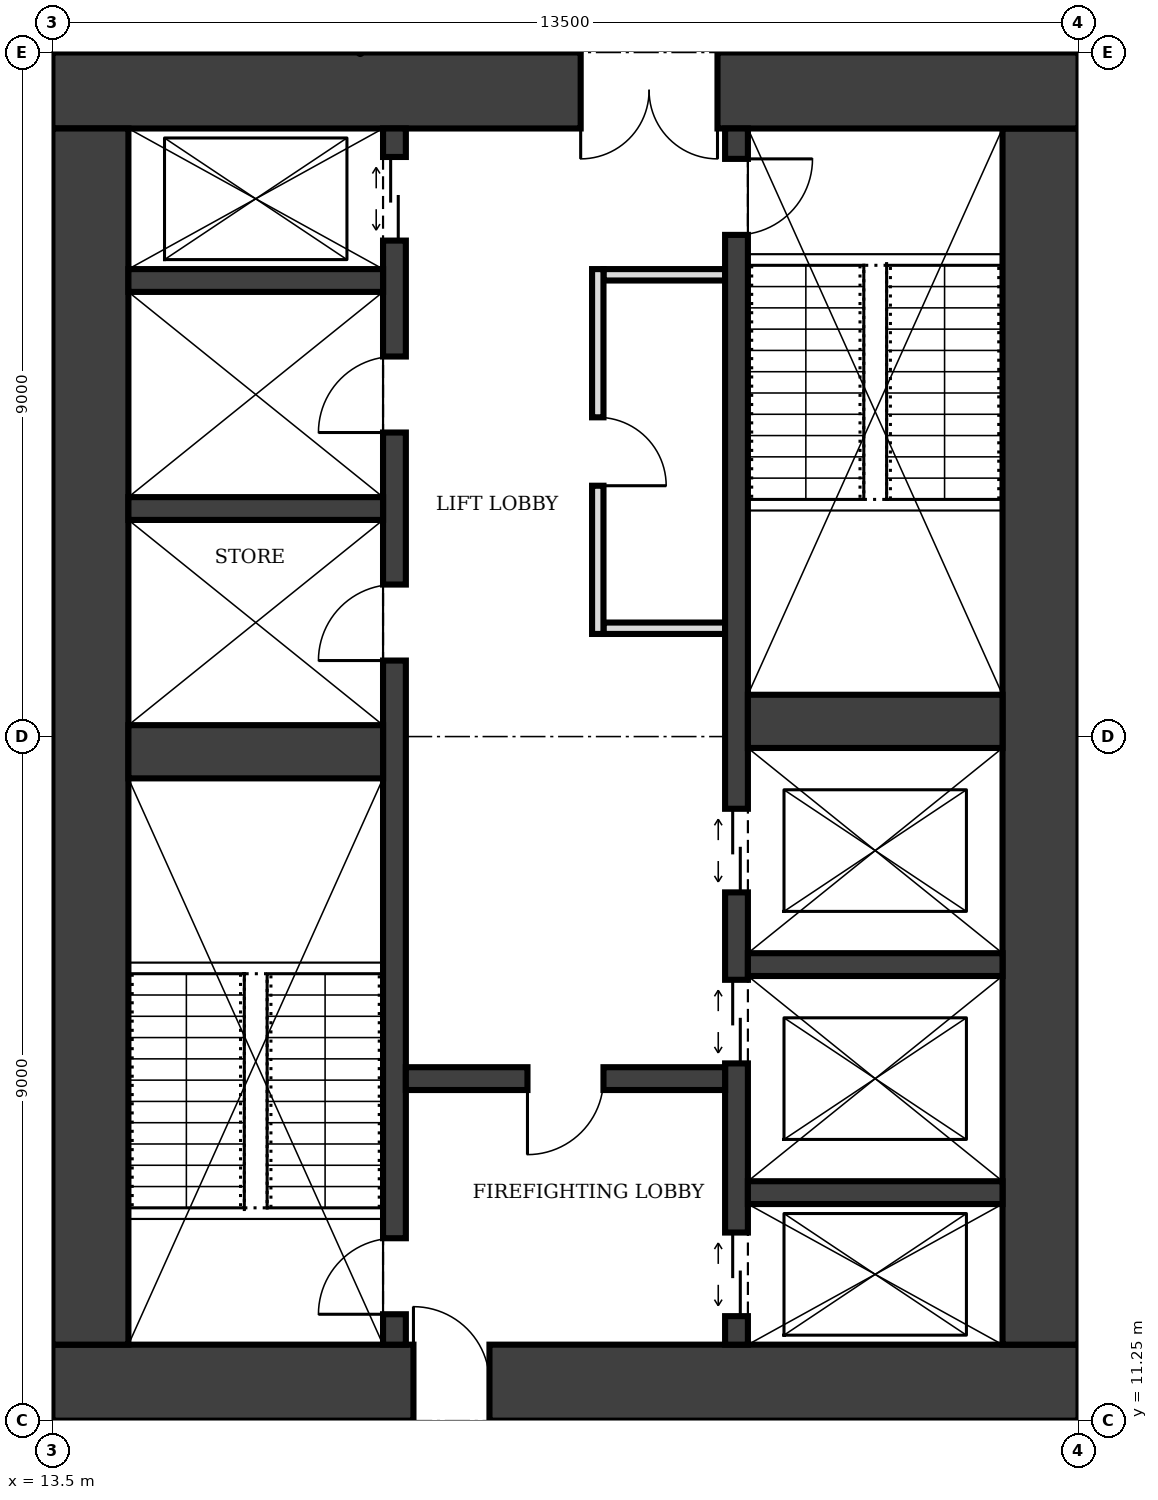
"""IFC4 building model, lengths in metres.
Left out: names, types, materials, properties, quantities, classifications, styles, units other than length and angle.
Written with IfcOpenShell. Run it as: python <this file> out.ifc"""

import sys

from ifc_helpers import new_model, si_unit, direction, frame, frame_2d, origin, place, context, subcontext, project, spatial, rectangle, extrude, element, fill, save


model = new_model("IFC4")
c1 = context("Model", 3, precision=1e-05, world=origin(), true_north=direction((0.0, 1.0)))
c2 = subcontext(c1, "Body", "Model", "MODEL_VIEW")
j1 = project(units=[si_unit("LENGTHUNIT", "METRE"), si_unit("PLANEANGLEUNIT", "RADIAN")], contexts=[c1])
p1 = place(None, origin())
s1 = spatial("IfcSite", under=j1, at=p1, CompositionType="ELEMENT")
p2 = place(p1, origin())
s2 = spatial("IfcBuilding", under=s1, at=p2, CompositionType="ELEMENT")
p3 = place(p2, frame((0.0, 0.0, 133.0)))
s3 = spatial("IfcBuildingStorey", under=s2, at=p3, CompositionType="ELEMENT", Elevation=133.0)
p4 = place(p3, frame((13.5, 11.75, 0.0), z_axis=(0.0, 0.0, 1.0), x_axis=(1.0, 0.0, 0.0)))
e1 = element("IfcWall", 1, at=p4, inside=s3, PredefinedType="SHEAR", context=c2, shape_type="SweptSolid", body=[
    extrude(rectangle(XDim=13.5, YDim=1.0, at=frame_2d((6.75, 0.0))), origin(), (0.0, 0.0, 1.0), 4.0),
])
p5 = place(p4, frame((4.75, 0.0, 0.0)))
e2 = element("IfcOpeningElement", 2, at=p5, cuts=e1, PredefinedType="OPENING", context=c2, shape_type="SweptSolid", body=[
    extrude(rectangle(XDim=1.0, YDim=2.1, at=frame_2d((0.5, 1.05))), frame((0.0, 0.51, 0.0), z_axis=(0.0, -1.0, 0.0), x_axis=(1.0, 0.0, 0.0)), (0.0, 0.0, 1.0), 1.02),
])
p6 = place(p3, frame((26.5, 12.25, 0.0), z_axis=(0.0, 0.0, 1.0), x_axis=(0.0, 1.0, 0.0)))
e3 = element("IfcWall", 3, at=p6, inside=s3, PredefinedType="SHEAR", context=c2, shape_type="SweptSolid", body=[
    extrude(rectangle(XDim=16.0, YDim=1.0, at=frame_2d((8.0, 0.0))), origin(), (0.0, 0.0, 1.0), 4.0),
])
p7 = place(p3, frame((27.0, 28.75, 0.0), z_axis=(0.0, 0.0, 1.0), x_axis=(-1.0, 0.0, 0.0)))
e4 = element("IfcWall", 4, at=p7, inside=s3, PredefinedType="SHEAR", context=c2, shape_type="SweptSolid", body=[
    extrude(rectangle(XDim=13.5, YDim=1.0, at=frame_2d((6.75, 0.0))), origin(), (0.0, 0.0, 1.0), 4.0),
])
p8 = place(p7, frame((4.75, 0.0, 0.0)))
e5 = element("IfcOpeningElement", 5, at=p8, cuts=e4, PredefinedType="OPENING", context=c2, shape_type="SweptSolid", body=[
    extrude(rectangle(XDim=1.8, YDim=2.1, at=frame_2d((0.9, 1.05))), frame((0.0, 0.51, 0.0), z_axis=(0.0, -1.0, 0.0), x_axis=(1.0, 0.0, 0.0)), (0.0, 0.0, 1.0), 1.02),
])
p9 = place(p3, frame((14.0, 28.25, 0.0), z_axis=(0.0, 0.0, 1.0), x_axis=(0.0, -1.0, 0.0)))
e6 = element("IfcWall", 6, at=p9, inside=s3, PredefinedType="SHEAR", context=c2, shape_type="SweptSolid", body=[
    extrude(rectangle(XDim=16.0, YDim=1.0, at=frame_2d((8.0, 0.0))), origin(), (0.0, 0.0, 1.0), 4.0),
])
p10 = place(p3, frame((18.0, 12.25, 0.0), z_axis=(0.0, 0.0, 1.0), x_axis=(0.0, 1.0, 0.0)))
e7 = element("IfcWall", 7, at=p10, inside=s3, PredefinedType="SHEAR", context=c2, shape_type="SweptSolid", body=[
    extrude(rectangle(XDim=16.0, YDim=0.3, at=frame_2d((8.0, 0.0))), origin(), (0.0, 0.0, 1.0), 4.0),
])
p11 = place(p10, frame((0.4, 0.0, 0.0)))
e8 = element("IfcOpeningElement", 8, at=p11, cuts=e7, PredefinedType="OPENING", context=c2, shape_type="SweptSolid", body=[
    extrude(rectangle(XDim=1.0, YDim=2.1, at=frame_2d((0.5, 1.05))), frame((0.0, 0.16, 0.0), z_axis=(0.0, -1.0, 0.0), x_axis=(1.0, 0.0, 0.0)), (0.0, 0.0, 1.0), 0.32),
])
p12 = place(p10, frame((14.525, 0.0, 0.0)))
e9 = element("IfcOpeningElement", 9, at=p12, cuts=e7, PredefinedType="OPENING", context=c2, shape_type="SweptSolid", body=[
    extrude(rectangle(XDim=1.1, YDim=2.1, at=frame_2d((0.55, 1.05))), frame((0.0, 0.16, 0.0), z_axis=(0.0, -1.0, 0.0), x_axis=(1.0, 0.0, 0.0)), (0.0, 0.0, 1.0), 0.32),
])
p13 = place(p10, frame((9.0, 0.0, 0.0)))
e10 = element("IfcOpeningElement", 10, at=p13, cuts=e7, PredefinedType="OPENING", context=c2, shape_type="SweptSolid", body=[
    extrude(rectangle(XDim=1.0, YDim=2.1, at=frame_2d((0.5, 1.05))), frame((0.0, 0.16, 0.0), z_axis=(0.0, -1.0, 0.0), x_axis=(1.0, 0.0, 0.0)), (0.0, 0.0, 1.0), 0.32),
])
p14 = place(p10, frame((12.0, 0.0, 0.0)))
e11 = element("IfcOpeningElement", 11, at=p14, cuts=e7, PredefinedType="OPENING", context=c2, shape_type="SweptSolid", body=[
    extrude(rectangle(XDim=1.0, YDim=2.1, at=frame_2d((0.5, 1.05))), frame((0.0, 0.16, 0.0), z_axis=(0.0, -1.0, 0.0), x_axis=(1.0, 0.0, 0.0)), (0.0, 0.0, 1.0), 0.32),
])
p15 = place(p3, frame((22.5, 12.25, 0.0), z_axis=(0.0, 0.0, 1.0), x_axis=(0.0, 1.0, 0.0)))
e12 = element("IfcWall", 12, at=p15, inside=s3, PredefinedType="SHEAR", context=c2, shape_type="SweptSolid", body=[
    extrude(rectangle(XDim=16.0, YDim=0.3, at=frame_2d((8.0, 0.0))), origin(), (0.0, 0.0, 1.0), 4.0),
])
p16 = place(p15, frame((14.6, 0.0, 0.0)))
e13 = element("IfcOpeningElement", 13, at=p16, cuts=e12, PredefinedType="OPENING", context=c2, shape_type="SweptSolid", body=[
    extrude(rectangle(XDim=1.0, YDim=2.1, at=frame_2d((0.5, 1.05))), frame((0.0, 0.16, 0.0), z_axis=(0.0, -1.0, 0.0), x_axis=(1.0, 0.0, 0.0)), (0.0, 0.0, 1.0), 0.32),
])
p17 = place(p15, frame((0.375, 0.0, 0.0)))
e14 = element("IfcOpeningElement", 14, at=p17, cuts=e12, PredefinedType="OPENING", context=c2, shape_type="SweptSolid", body=[
    extrude(rectangle(XDim=1.1, YDim=2.1, at=frame_2d((0.55, 1.05))), frame((0.0, 0.16, 0.0), z_axis=(0.0, -1.0, 0.0), x_axis=(1.0, 0.0, 0.0)), (0.0, 0.0, 1.0), 0.32),
])
p18 = place(p15, frame((3.7, 0.0, 0.0)))
e15 = element("IfcOpeningElement", 15, at=p18, cuts=e12, PredefinedType="OPENING", context=c2, shape_type="SweptSolid", body=[
    extrude(rectangle(XDim=1.1, YDim=2.1, at=frame_2d((0.55, 1.05))), frame((0.0, 0.16, 0.0), z_axis=(0.0, -1.0, 0.0), x_axis=(1.0, 0.0, 0.0)), (0.0, 0.0, 1.0), 0.32),
])
p19 = place(p15, frame((5.95, 0.0, 0.0)))
e16 = element("IfcOpeningElement", 16, at=p19, cuts=e12, PredefinedType="OPENING", context=c2, shape_type="SweptSolid", body=[
    extrude(rectangle(XDim=1.1, YDim=2.1, at=frame_2d((0.55, 1.05))), frame((0.0, 0.16, 0.0), z_axis=(0.0, -1.0, 0.0), x_axis=(1.0, 0.0, 0.0)), (0.0, 0.0, 1.0), 0.32),
])
p20 = place(p3, frame((14.5, 20.05, 0.0), z_axis=(0.0, 0.0, 1.0), x_axis=(1.0, 0.0, 0.0)))
e17 = element("IfcWall", 17, at=p20, inside=s3, PredefinedType="SHEAR", context=c2, shape_type="SweptSolid", body=[
    extrude(rectangle(XDim=3.35, YDim=0.7, at=frame_2d((1.675, 0.0))), origin(), (0.0, 0.0, 1.0), 4.0),
])
p21 = place(p3, frame((18.15, 15.75, 0.0), z_axis=(0.0, 0.0, 1.0), x_axis=(1.0, 0.0, 0.0)))
e18 = element("IfcWall", 18, at=p21, inside=s3, PredefinedType="SHEAR", context=c2, shape_type="SweptSolid", body=[
    extrude(rectangle(XDim=4.2, YDim=0.3, at=frame_2d((2.1, 0.0))), origin(), (0.0, 0.0, 1.0), 4.0),
])
p22 = place(p21, frame((1.6, 0.0, 0.0)))
e19 = element("IfcOpeningElement", 19, at=p22, cuts=e18, PredefinedType="OPENING", context=c2, shape_type="SweptSolid", body=[
    extrude(rectangle(XDim=1.0, YDim=2.1, at=frame_2d((0.5, 1.05))), frame((0.0, 0.16, 0.0), z_axis=(0.0, -1.0, 0.0), x_axis=(1.0, 0.0, 0.0)), (0.0, 0.0, 1.0), 0.32),
])
for number, where, z_axis, x_axis in (
    (20, (22.65, 14.25, 0.0), (0.0, 0.0, 1.0), (1.0, 0.0, 0.0)),
    (21, (22.65, 17.25, 0.0), (0.0, 0.0, 1.0), (1.0, 0.0, 0.0)),
):
    element("IfcWall", number, at=place(p3, frame(where, z_axis=z_axis, x_axis=x_axis)), inside=s3, PredefinedType="SHEAR", context=c2, shape_type="SweptSolid", body=[
        extrude(rectangle(XDim=3.35, YDim=0.3, at=frame_2d((1.675, 0.0))), origin(), (0.0, 0.0, 1.0), 4.0),
    ])
p23 = place(p3, frame((22.65, 20.45, 0.0), z_axis=(0.0, 0.0, 1.0), x_axis=(1.0, 0.0, 0.0)))
e22 = element("IfcWall", 22, at=p23, inside=s3, PredefinedType="SHEAR", context=c2, shape_type="SweptSolid", body=[
    extrude(rectangle(XDim=3.35, YDim=0.7, at=frame_2d((1.675, 0.0))), origin(), (0.0, 0.0, 1.0), 4.0),
])
for number, where, z_axis, x_axis in (
    (23, (14.5, 23.25, 0.0), (0.0, 0.0, 1.0), (1.0, 0.0, 0.0)),
    (24, (14.5, 26.25, 0.0), (0.0, 0.0, 1.0), (1.0, 0.0, 0.0)),
):
    element("IfcWall", number, at=place(p3, frame(where, z_axis=z_axis, x_axis=x_axis)), inside=s3, PredefinedType="SHEAR", context=c2, shape_type="SweptSolid", body=[
        extrude(rectangle(XDim=3.35, YDim=0.3, at=frame_2d((1.675, 0.0))), origin(), (0.0, 0.0, 1.0), 4.0),
    ])
p24 = place(p3, frame((20.675, 21.6, 0.0), z_axis=(0.0, 0.0, 1.0), x_axis=(0.0, 1.0, 0.0)))
e25 = element("IfcWall", 25, at=p24, inside=s3, PredefinedType="PARTITIONING", context=c2, shape_type="SweptSolid", body=[
    extrude(rectangle(XDim=4.8, YDim=0.15, at=frame_2d((2.4, 0.0))), origin(), (0.0, 0.0, 1.0), 3.75),
])
p25 = place(p24, frame((1.95, 0.0, 0.0)))
e26 = element("IfcOpeningElement", 26, at=p25, cuts=e25, PredefinedType="OPENING", context=c2, shape_type="SweptSolid", body=[
    extrude(rectangle(XDim=0.9, YDim=2.1, at=frame_2d((0.45, 1.05))), frame((0.0, 0.085, 0.0), z_axis=(0.0, -1.0, 0.0), x_axis=(1.0, 0.0, 0.0)), (0.0, 0.0, 1.0), 0.17),
])
for number, where, z_axis, x_axis in (
    (27, (20.75, 21.675, 0.0), (0.0, 0.0, 1.0), (1.0, 0.0, 0.0)),
    (28, (20.75, 26.325, 0.0), (0.0, 0.0, 1.0), (1.0, 0.0, 0.0)),
):
    element("IfcWall", number, at=place(p3, frame(where, z_axis=z_axis, x_axis=x_axis)), inside=s3, PredefinedType="PARTITIONING", context=c2, shape_type="SweptSolid", body=[
        extrude(rectangle(XDim=1.6, YDim=0.15, at=frame_2d((0.8, 0.0))), origin(), (0.0, 0.0, 1.0), 3.75),
    ])
p26 = place(p5, origin())
e29 = element("IfcDoor", 29, at=p26, inside=s3, OperationType="SINGLE_SWING_LEFT", PredefinedType="DOOR", context=c2, shape_type="SweptSolid", body=[
    extrude(rectangle(XDim=1.0, YDim=2.1, at=frame_2d((0.5, 1.05))), frame((0.0, 0.025, 0.0), z_axis=(0.0, -1.0, 0.0), x_axis=(1.0, 0.0, 0.0)), (0.0, 0.0, 1.0), 0.05),
])
fill(e2, e29)
p27 = place(p8, origin())
e30 = element("IfcDoor", 30, at=p27, inside=s3, OperationType="DOUBLE_DOOR_SINGLE_SWING", PredefinedType="DOOR", context=c2, shape_type="SweptSolid", body=[
    extrude(rectangle(XDim=1.8, YDim=2.1, at=frame_2d((0.9, 1.05))), frame((0.0, 0.025, 0.0), z_axis=(0.0, -1.0, 0.0), x_axis=(1.0, 0.0, 0.0)), (0.0, 0.0, 1.0), 0.05),
])
fill(e5, e30)
p28 = place(p22, frame((1.0, 0.0, 0.0), z_axis=(0.0, 0.0, 1.0), x_axis=(-1.0, 0.0, 0.0)))
e31 = element("IfcDoor", 31, at=p28, inside=s3, OperationType="SINGLE_SWING_RIGHT", PredefinedType="DOOR", context=c2, shape_type="SweptSolid", body=[
    extrude(rectangle(XDim=1.0, YDim=2.1, at=frame_2d((0.5, 1.05))), frame((0.0, 0.025, 0.0), z_axis=(0.0, -1.0, 0.0), x_axis=(1.0, 0.0, 0.0)), (0.0, 0.0, 1.0), 0.05),
])
fill(e19, e31)
p29 = place(p11, origin())
e32 = element("IfcDoor", 32, at=p29, inside=s3, OperationType="SINGLE_SWING_LEFT", PredefinedType="DOOR", context=c2, shape_type="SweptSolid", body=[
    extrude(rectangle(XDim=1.0, YDim=2.1, at=frame_2d((0.5, 1.05))), frame((0.0, 0.025, 0.0), z_axis=(0.0, -1.0, 0.0), x_axis=(1.0, 0.0, 0.0)), (0.0, 0.0, 1.0), 0.05),
])
fill(e8, e32)
p30 = place(p16, frame((1.0, 0.0, 0.0), z_axis=(0.0, 0.0, 1.0), x_axis=(-1.0, 0.0, 0.0)))
e33 = element("IfcDoor", 33, at=p30, inside=s3, OperationType="SINGLE_SWING_LEFT", PredefinedType="DOOR", context=c2, shape_type="SweptSolid", body=[
    extrude(rectangle(XDim=1.0, YDim=2.1, at=frame_2d((0.5, 1.05))), frame((0.0, 0.025, 0.0), z_axis=(0.0, -1.0, 0.0), x_axis=(1.0, 0.0, 0.0)), (0.0, 0.0, 1.0), 0.05),
])
fill(e13, e33)
p31 = place(p17, origin())
e34 = element("IfcDoor", 34, at=p31, inside=s3, OperationType="DOUBLE_DOOR_SLIDING", PredefinedType="DOOR", context=c2, shape_type="SweptSolid", body=[
    extrude(rectangle(XDim=1.1, YDim=2.1, at=frame_2d((0.55, 1.05))), frame((0.0, 0.025, 0.0), z_axis=(0.0, -1.0, 0.0), x_axis=(1.0, 0.0, 0.0)), (0.0, 0.0, 1.0), 0.05),
])
fill(e14, e34)
p32 = place(p12, origin())
e35 = element("IfcDoor", 35, at=p32, inside=s3, OperationType="DOUBLE_DOOR_SLIDING", PredefinedType="DOOR", context=c2, shape_type="SweptSolid", body=[
    extrude(rectangle(XDim=1.1, YDim=2.1, at=frame_2d((0.55, 1.05))), frame((0.0, 0.025, 0.0), z_axis=(0.0, -1.0, 0.0), x_axis=(1.0, 0.0, 0.0)), (0.0, 0.0, 1.0), 0.05),
])
fill(e9, e35)
p33 = place(p18, origin())
e36 = element("IfcDoor", 36, at=p33, inside=s3, OperationType="DOUBLE_DOOR_SLIDING", PredefinedType="DOOR", context=c2, shape_type="SweptSolid", body=[
    extrude(rectangle(XDim=1.1, YDim=2.1, at=frame_2d((0.55, 1.05))), frame((0.0, 0.025, 0.0), z_axis=(0.0, -1.0, 0.0), x_axis=(1.0, 0.0, 0.0)), (0.0, 0.0, 1.0), 0.05),
])
fill(e15, e36)
p34 = place(p19, origin())
e37 = element("IfcDoor", 37, at=p34, inside=s3, OperationType="DOUBLE_DOOR_SLIDING", PredefinedType="DOOR", context=c2, shape_type="SweptSolid", body=[
    extrude(rectangle(XDim=1.1, YDim=2.1, at=frame_2d((0.55, 1.05))), frame((0.0, 0.025, 0.0), z_axis=(0.0, -1.0, 0.0), x_axis=(1.0, 0.0, 0.0)), (0.0, 0.0, 1.0), 0.05),
])
fill(e16, e37)
p35 = place(p25, frame((0.9, 0.0, 0.0), z_axis=(0.0, 0.0, 1.0), x_axis=(-1.0, 0.0, 0.0)))
e38 = element("IfcDoor", 38, at=p35, inside=s3, OperationType="SINGLE_SWING_RIGHT", PredefinedType="DOOR", context=c2, shape_type="SweptSolid", body=[
    extrude(rectangle(XDim=0.9, YDim=2.1, at=frame_2d((0.45, 1.05))), frame((0.0, 0.025, 0.0), z_axis=(0.0, -1.0, 0.0), x_axis=(1.0, 0.0, 0.0)), (0.0, 0.0, 1.0), 0.05),
])
fill(e26, e38)
p36 = place(p13, origin())
e39 = element("IfcDoor", 39, at=p36, inside=s3, OperationType="SINGLE_SWING_LEFT", PredefinedType="DOOR", context=c2, shape_type="SweptSolid", body=[
    extrude(rectangle(XDim=1.0, YDim=2.1, at=frame_2d((0.5, 1.05))), frame((0.0, 0.025, 0.0), z_axis=(0.0, -1.0, 0.0), x_axis=(1.0, 0.0, 0.0)), (0.0, 0.0, 1.0), 0.05),
])
fill(e10, e39)
p37 = place(p14, origin())
e40 = element("IfcDoor", 40, at=p37, inside=s3, OperationType="SINGLE_SWING_LEFT", PredefinedType="DOOR", context=c2, shape_type="SweptSolid", body=[
    extrude(rectangle(XDim=1.0, YDim=2.1, at=frame_2d((0.5, 1.05))), frame((0.0, 0.025, 0.0), z_axis=(0.0, -1.0, 0.0), x_axis=(1.0, 0.0, 0.0)), (0.0, 0.0, 1.0), 0.05),
])
fill(e11, e40)
save(model, sys.argv[1])
